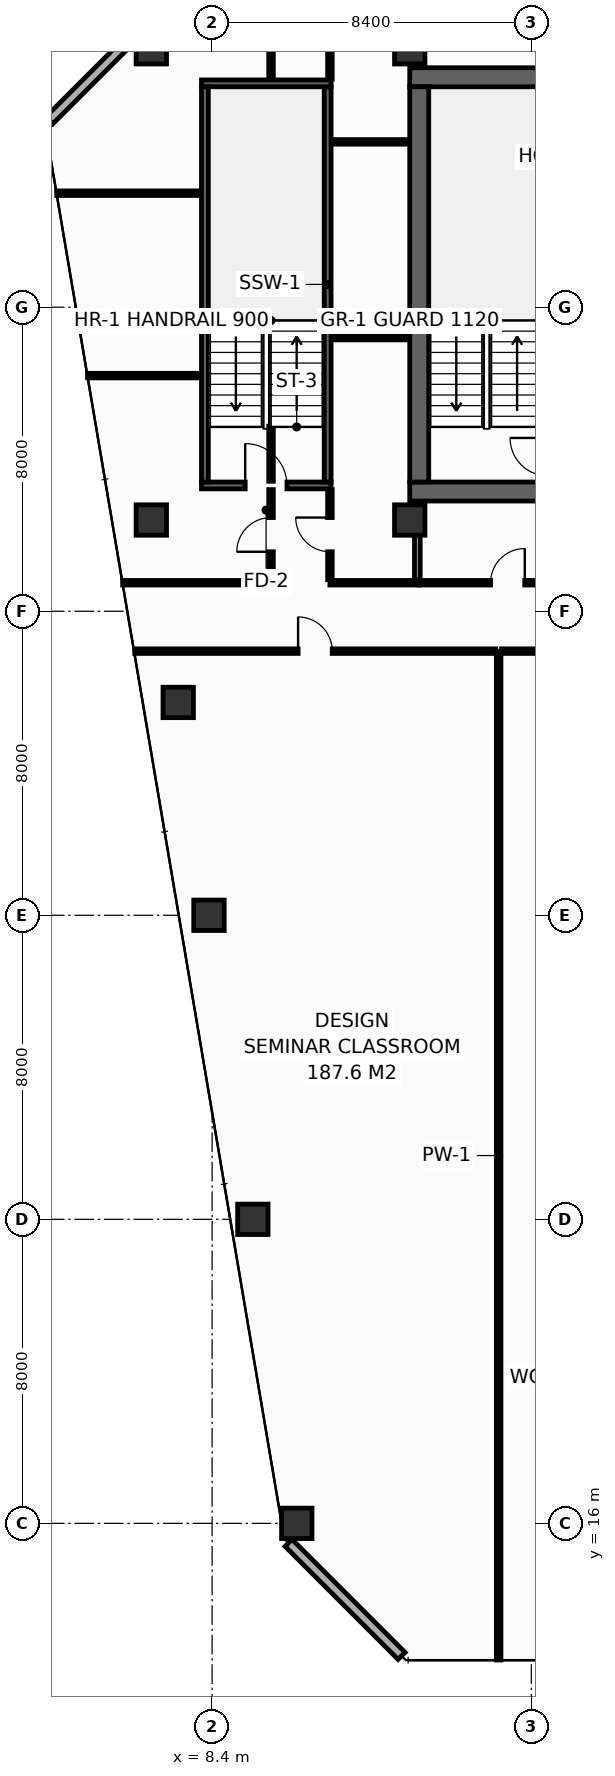
"""IFC4 building model, lengths in metres.
Left out: names, types, materials, properties, quantities, classifications, styles, units other than length and angle.
Written with IfcOpenShell. Run it as: python <this file> out.ifc"""

import sys

from ifc_helpers import new_model, si_unit, direction, frame, frame_2d, origin, origin_2d, place, context, subcontext, project, spatial, rectangle, hollow_rectangle, extrude, element, fill, save


model = new_model("IFC4")
c1 = context("Model", 3, precision=1e-05, world=origin(), true_north=direction((0.0, 1.0)))
c2 = subcontext(c1, "Body", "Model", "MODEL_VIEW")
j1 = project(units=[si_unit("LENGTHUNIT", "METRE"), si_unit("PLANEANGLEUNIT", "RADIAN")], contexts=[c1])
p1 = place(None, origin())
s1 = spatial("IfcSite", under=j1, at=p1, CompositionType="ELEMENT")
p2 = place(p1, origin())
s2 = spatial("IfcBuilding", under=s1, at=p2, CompositionType="ELEMENT")
p3 = place(p2, frame((0.0, 0.0, 220.8)))
s3 = spatial("IfcBuildingStorey", under=s2, at=p3, CompositionType="ELEMENT", Elevation=220.8)
p4 = place(p3, frame((13.6, 43.15, 0.0), z_axis=(0.0, 0.0, 1.0), x_axis=(1.0, 0.0, 0.0)))
e1 = element("IfcWall", 1, at=p4, inside=s3, PredefinedType="SHEAR", context=c2, shape_type="SweptSolid", body=[
    extrude(rectangle(XDim=32.7, YDim=0.5, at=frame_2d((16.35, 0.0))), origin(), (0.0, 0.0, 1.0), 3.35),
])
p5 = place(p4, frame((5.4, 0.0, 0.0)))
e2 = element("IfcOpeningElement", 2, at=p5, cuts=e1, PredefinedType="OPENING", context=c2, shape_type="SweptSolid", body=[
    extrude(rectangle(XDim=1.1, YDim=2.15, at=frame_2d((0.55, 1.075))), frame((0.0, 0.26, 0.0), z_axis=(0.0, -1.0, 0.0), x_axis=(1.0, 0.0, 0.0)), (0.0, 0.0, 1.0), 0.52),
])
p6 = place(p4, frame((25.6, 0.0, 0.0)))
e3 = element("IfcOpeningElement", 3, at=p6, cuts=e1, PredefinedType="OPENING", context=c2, shape_type="SweptSolid", body=[
    extrude(rectangle(XDim=1.1, YDim=2.15, at=frame_2d((0.55, 1.075))), frame((0.0, 0.26, 0.0), z_axis=(0.0, -1.0, 0.0), x_axis=(1.0, 0.0, 0.0)), (0.0, 0.0, 1.0), 0.52),
])
p7 = place(p3, frame((13.6, 54.05, 0.0), z_axis=(0.0, 0.0, 1.0), x_axis=(1.0, 0.0, 0.0)))
e4 = element("IfcWall", 4, at=p7, inside=s3, PredefinedType="SHEAR", context=c2, shape_type="SweptSolid", body=[
    extrude(rectangle(XDim=32.7, YDim=0.5, at=frame_2d((16.35, 0.0))), origin(), (0.0, 0.0, 1.0), 3.35),
])
p8 = place(p3, frame((13.85, 43.4, 0.0), z_axis=(0.0, 0.0, 1.0), x_axis=(0.0, 1.0, 0.0)))
e5 = element("IfcWall", 5, at=p8, inside=s3, PredefinedType="SHEAR", context=c2, shape_type="SweptSolid", body=[
    extrude(rectangle(XDim=10.4, YDim=0.5, at=frame_2d((5.2, 0.0))), origin(), (0.0, 0.0, 1.0), 3.35),
])
for number, where, z_axis, x_axis in (
    (6, (6.8, 54.8, 0.0), (0.0, 0.0, 1.0), (1.0, 0.0, 0.0)),
    (7, (13.6, 54.8, 0.0), (0.0, 0.0, 1.0), (1.0, 0.0, 0.0)),
    (8, (6.8, 42.4, 0.0), (0.0, 0.0, 1.0), (1.0, 0.0, 0.0)),
    (9, (13.6, 42.4, 0.0), (0.0, 0.0, 1.0), (1.0, 0.0, 0.0)),
    (10, (10.628, 16.0, 0.0), (0.0, 0.0, 1.0), (1.0, 0.0, 0.0)),
    (11, (9.472, 24.0, 0.0), (0.0, 0.0, 1.0), (1.0, 0.0, 0.0)),
    (12, (8.317, 32.0, 0.0), (0.0, 0.0, 1.0), (1.0, 0.0, 0.0)),
    (13, (7.508, 37.6, 0.0), (0.0, 0.0, 1.0), (1.0, 0.0, 0.0)),
):
    element("IfcColumn", number, at=place(p3, frame(where, z_axis=z_axis, x_axis=x_axis)), inside=s3, PredefinedType="COLUMN", context=c2, shape_type="SweptSolid", body=[
        extrude(hollow_rectangle(XDim=0.8, YDim=0.8, WallThickness=0.036, at=origin_2d()), origin(), (0.0, 0.0, 1.0), 3.8),
    ])
p9 = place(p3, frame((8.12, 43.31, 0.0), z_axis=(0.0, 0.0, 1.0), x_axis=(1.0, 0.0, 0.0)))
e14 = element("IfcWall", 14, at=p9, inside=s3, PredefinedType="SHEAR", context=c2, shape_type="SweptSolid", body=[
    extrude(rectangle(XDim=3.41, YDim=0.18, at=frame_2d((1.705, 0.0))), origin(), (0.0, 0.0, 1.0), 3.35),
])
p10 = place(p9, frame((1.15, 0.0, 0.0)))
e15 = element("IfcOpeningElement", 15, at=p10, cuts=e14, PredefinedType="OPENING", context=c2, shape_type="SweptSolid", body=[
    extrude(rectangle(XDim=1.1, YDim=2.15, at=frame_2d((0.55, 1.075))), frame((0.0, 0.1, 0.0), z_axis=(0.0, -1.0, 0.0), x_axis=(1.0, 0.0, 0.0)), (0.0, 0.0, 1.0), 0.2),
])
p11 = place(p3, frame((11.44, 43.4, 0.0), z_axis=(0.0, 0.0, 1.0), x_axis=(0.0, 1.0, 0.0)))
e16 = element("IfcWall", 16, at=p11, inside=s3, PredefinedType="SHEAR", context=c2, shape_type="SweptSolid", body=[
    extrude(rectangle(XDim=10.4, YDim=0.18, at=frame_2d((5.2, 0.0))), origin(), (0.0, 0.0, 1.0), 3.35),
])
p12 = place(p3, frame((11.53, 53.89, 0.0), z_axis=(0.0, 0.0, 1.0), x_axis=(-1.0, 0.0, 0.0)))
e17 = element("IfcWall", 17, at=p12, inside=s3, PredefinedType="SHEAR", context=c2, shape_type="SweptSolid", body=[
    extrude(rectangle(XDim=3.41, YDim=0.18, at=frame_2d((1.705, 0.0))), origin(), (0.0, 0.0, 1.0), 3.35),
])
p13 = place(p3, frame((8.21, 53.8, 0.0), z_axis=(0.0, 0.0, 1.0), x_axis=(0.0, -1.0, 0.0)))
e18 = element("IfcWall", 18, at=p13, inside=s3, PredefinedType="SHEAR", context=c2, shape_type="SweptSolid", body=[
    extrude(rectangle(XDim=10.4, YDim=0.18, at=frame_2d((5.2, 0.0))), origin(), (0.0, 0.0, 1.0), 3.35),
])
p14 = place(p3, frame((10.411, 15.487, 0.0), z_axis=(0.0, 0.0, 1.0), x_axis=(0.707135806771, -0.70707775441, 0.0)))
e19 = element("IfcWall", 19, at=p14, inside=s3, PredefinedType="STANDARD", context=c2, shape_type="SweptSolid", body=[
    extrude(rectangle(XDim=4.206, YDim=0.26, at=frame_2d((2.103, 0.0))), origin(), (0.0, 0.0, 1.0), 3.35),
])
p15 = place(p3, frame((7.087, 55.887, 0.0), z_axis=(0.0, 0.0, 1.0), x_axis=(-0.707106781187, -0.707106781187, 0.0)))
e20 = element("IfcWall", 20, at=p15, inside=s3, PredefinedType="STANDARD", context=c2, shape_type="SweptSolid", body=[
    extrude(rectangle(XDim=4.206, YDim=0.26, at=frame_2d((2.103, 0.0))), origin(), (0.0, 0.0, 1.0), 3.35),
])
p16 = place(p3, frame((6.045, 40.75, 0.0), z_axis=(0.0, 0.0, 1.0), x_axis=(1.0, 0.0, 0.0)))
e21 = element("IfcWall", 21, at=p16, inside=s3, PredefinedType="PARTITIONING", context=c2, shape_type="SweptSolid", body=[
    extrude(rectangle(XDim=3.905, YDim=0.12, at=frame_2d((1.952, 0.0))), origin(), (0.0, 0.0, 1.0), 2.835),
])
p17 = place(p3, frame((11.5, 40.75, 0.0), z_axis=(0.0, 0.0, 1.0), x_axis=(1.0, 0.0, 0.0)))
e22 = element("IfcWall", 22, at=p17, inside=s3, PredefinedType="PARTITIONING", context=c2, shape_type="SweptSolid", body=[
    extrude(rectangle(XDim=2.35, YDim=0.12, at=frame_2d((1.175, 0.0))), origin(), (0.0, 0.0, 1.0), 3.35),
])
p18 = place(p3, frame((11.55, 52.35, 0.0), z_axis=(0.0, 0.0, 1.0), x_axis=(1.0, 0.0, 0.0)))
e23 = element("IfcWall", 23, at=p18, inside=s3, PredefinedType="PARTITIONING", context=c2, shape_type="SweptSolid", body=[
    extrude(rectangle(XDim=2.03, YDim=0.12, at=frame_2d((1.015, 0.0))), origin(), (0.0, 0.0, 1.0), 3.35),
])
p19 = place(p3, frame((11.5, 54.0, 0.0), z_axis=(0.0, 0.0, 1.0), x_axis=(0.0, 1.0, 0.0)))
e24 = element("IfcWall", 24, at=p19, inside=s3, PredefinedType="PARTITIONING", context=c2, shape_type="SweptSolid", body=[
    extrude(rectangle(XDim=1.995, YDim=0.12, at=frame_2d((0.998, 0.0))), origin(), (0.0, 0.0, 1.0), 2.735),
])
p20 = place(p3, frame((5.122, 46.2, 0.0), z_axis=(0.0, 0.0, 1.0), x_axis=(1.0, 0.0, 0.0)))
e25 = element("IfcWall", 25, at=p20, inside=s3, PredefinedType="PARTITIONING", context=c2, shape_type="SweptSolid", body=[
    extrude(rectangle(XDim=2.978, YDim=0.12, at=frame_2d((1.489, 0.0))), origin(), (0.0, 0.0, 1.0), 2.635),
])
p21 = place(p3, frame((4.31, 51.0, 0.0), z_axis=(0.0, 0.0, 1.0), x_axis=(1.0, 0.0, 0.0)))
e26 = element("IfcWall", 26, at=p21, inside=s3, PredefinedType="PARTITIONING", context=c2, shape_type="SweptSolid", body=[
    extrude(rectangle(XDim=3.79, YDim=0.12, at=frame_2d((1.895, 0.0))), origin(), (0.0, 0.0, 1.0), 2.635),
])
p22 = place(p3, frame((9.95, 40.83, 0.0), z_axis=(0.0, 0.0, 1.0), x_axis=(0.0, 1.0, 0.0)))
e27 = element("IfcWall", 27, at=p22, inside=s3, PredefinedType="PARTITIONING", context=c2, shape_type="SweptSolid", body=[
    extrude(rectangle(XDim=2.37, YDim=0.12, at=frame_2d((1.185, 0.0))), origin(), (0.0, 0.0, 1.0), 2.635),
])
p23 = place(p22, frame((0.735, 0.0, 0.0)))
e28 = element("IfcOpeningElement", 28, at=p23, cuts=e27, PredefinedType="OPENING", context=c2, shape_type="SweptSolid", body=[
    extrude(rectangle(XDim=0.9, YDim=2.1, at=frame_2d((0.45, 1.05))), frame((0.0, 0.07, 0.0), z_axis=(0.0, -1.0, 0.0), x_axis=(1.0, 0.0, 0.0)), (0.0, 0.0, 1.0), 0.14),
])
p24 = place(p3, frame((9.95, 43.42, 0.0), z_axis=(0.0, 0.0, 1.0), x_axis=(0.0, 1.0, 0.0)))
e29 = element("IfcWall", 29, at=p24, inside=s3, PredefinedType="PARTITIONING", context=c2, shape_type="SweptSolid", body=[
    extrude(rectangle(XDim=1.45, YDim=0.12, at=frame_2d((0.725, 0.0))), origin(), (0.0, 0.0, 1.0), 3.35),
])
p25 = place(p3, frame((9.95, 54.0, 0.0), z_axis=(0.0, 0.0, 1.0), x_axis=(0.0, 1.0, 0.0)))
e30 = element("IfcWall", 30, at=p25, inside=s3, PredefinedType="PARTITIONING", context=c2, shape_type="SweptSolid", body=[
    extrude(rectangle(XDim=1.995, YDim=0.12, at=frame_2d((0.998, 0.0))), origin(), (0.0, 0.0, 1.0), 2.735),
])
p26 = place(p3, frame((11.55, 47.2, 0.0), z_axis=(0.0, 0.0, 1.0), x_axis=(1.0, 0.0, 0.0)))
e31 = element("IfcWall", 31, at=p26, inside=s3, PredefinedType="PARTITIONING", context=c2, shape_type="SweptSolid", body=[
    extrude(rectangle(XDim=2.03, YDim=0.12, at=frame_2d((1.015, 0.0))), origin(), (0.0, 0.0, 1.0), 3.35),
])
p27 = place(p3, frame((11.5, 40.83, 0.0), z_axis=(0.0, 0.0, 1.0), x_axis=(0.0, 1.0, 0.0)))
e32 = element("IfcWall", 32, at=p27, inside=s3, PredefinedType="PARTITIONING", context=c2, shape_type="SweptSolid", body=[
    extrude(rectangle(XDim=2.37, YDim=0.12, at=frame_2d((1.185, 0.0))), origin(), (0.0, 0.0, 1.0), 2.635),
])
p28 = place(p27, frame((0.735, 0.0, 0.0)))
e33 = element("IfcOpeningElement", 33, at=p28, cuts=e32, PredefinedType="OPENING", context=c2, shape_type="SweptSolid", body=[
    extrude(rectangle(XDim=0.9, YDim=2.1, at=frame_2d((0.45, 1.05))), frame((0.0, 0.07, 0.0), z_axis=(0.0, -1.0, 0.0), x_axis=(1.0, 0.0, 0.0)), (0.0, 0.0, 1.0), 0.14),
])
p29 = place(p3, frame((13.8, 40.83, 0.0), z_axis=(0.0, 0.0, 1.0), x_axis=(0.0, 1.0, 0.0)))
e34 = element("IfcWall", 34, at=p29, inside=s3, PredefinedType="PARTITIONING", context=c2, shape_type="SweptSolid", body=[
    extrude(rectangle(XDim=2.05, YDim=0.15, at=frame_2d((1.025, 0.0))), origin(), (0.0, 0.0, 1.0), 3.35),
])
p30 = place(p3, frame((13.85, 40.75, 0.0), z_axis=(0.0, 0.0, 1.0), x_axis=(1.0, 0.0, 0.0)))
e35 = element("IfcWall", 35, at=p30, inside=s3, PredefinedType="PARTITIONING", context=c2, shape_type="SweptSolid", body=[
    extrude(rectangle(XDim=4.655, YDim=0.12, at=frame_2d((2.327, 0.0))), origin(), (0.0, 0.0, 1.0), 3.35),
])
p31 = place(p30, frame((1.877, 0.0, 0.0)))
e36 = element("IfcOpeningElement", 36, at=p31, cuts=e35, PredefinedType="OPENING", context=c2, shape_type="SweptSolid", body=[
    extrude(rectangle(XDim=0.9, YDim=2.1, at=frame_2d((0.45, 1.05))), frame((0.0, 0.07, 0.0), z_axis=(0.0, -1.0, 0.0), x_axis=(1.0, 0.0, 0.0)), (0.0, 0.0, 1.0), 0.14),
])
p32 = place(p3, frame((15.94, 12.405, 0.0), z_axis=(0.0, 0.0, 1.0), x_axis=(0.0, 1.0, 0.0)))
e37 = element("IfcWall", 37, at=p32, inside=s3, PredefinedType="PARTITIONING", context=c2, shape_type="SweptSolid", body=[
    extrude(rectangle(XDim=26.545, YDim=0.12, at=frame_2d((13.272, 0.0))), origin(), (0.0, 0.0, 1.0), 2.635),
])
p33 = place(p3, frame((6.363, 38.95, 0.0), z_axis=(0.0, 0.0, 1.0), x_axis=(1.0, 0.0, 0.0)))
e38 = element("IfcWall", 38, at=p33, inside=s3, PredefinedType="PARTITIONING", context=c2, shape_type="SweptSolid", body=[
    extrude(rectangle(XDim=9.497, YDim=0.12, at=frame_2d((4.749, 0.0))), origin(), (0.0, 0.0, 1.0), 2.835),
])
p34 = place(p33, frame((4.299, 0.0, 0.0)))
e39 = element("IfcOpeningElement", 39, at=p34, cuts=e38, PredefinedType="OPENING", context=c2, shape_type="SweptSolid", body=[
    extrude(rectangle(XDim=0.9, YDim=2.1, at=frame_2d((0.45, 1.05))), frame((0.0, 0.07, 0.0), z_axis=(0.0, -1.0, 0.0), x_axis=(1.0, 0.0, 0.0)), (0.0, 0.0, 1.0), 0.14),
])
p35 = place(p3, frame((16.02, 38.95, 0.0), z_axis=(0.0, 0.0, 1.0), x_axis=(1.0, 0.0, 0.0)))
e40 = element("IfcWall", 40, at=p35, inside=s3, PredefinedType="PARTITIONING", context=c2, shape_type="SweptSolid", body=[
    extrude(rectangle(XDim=7.83, YDim=0.12, at=frame_2d((3.915, 0.0))), origin(), (0.0, 0.0, 1.0), 2.635),
])
p36 = place(p35, frame((3.465, 0.0, 0.0)))
e41 = element("IfcOpeningElement", 41, at=p36, cuts=e40, PredefinedType="OPENING", context=c2, shape_type="SweptSolid", body=[
    extrude(rectangle(XDim=0.9, YDim=2.1, at=frame_2d((0.45, 1.05))), frame((0.0, 0.07, 0.0), z_axis=(0.0, -1.0, 0.0), x_axis=(1.0, 0.0, 0.0)), (0.0, 0.0, 1.0), 0.14),
])
p37 = place(p10, origin())
e42 = element("IfcDoor", 42, at=p37, inside=s3, OperationType="SINGLE_SWING_LEFT", PredefinedType="DOOR", context=c2, shape_type="SweptSolid", body=[
    extrude(rectangle(XDim=1.1, YDim=2.15, at=frame_2d((0.55, 1.075))), frame((0.0, 0.025, 0.0), z_axis=(0.0, -1.0, 0.0), x_axis=(1.0, 0.0, 0.0)), (0.0, 0.0, 1.0), 0.05),
])
fill(e15, e42)
p38 = place(p23, origin())
e43 = element("IfcDoor", 43, at=p38, inside=s3, OperationType="SINGLE_SWING_LEFT", PredefinedType="DOOR", context=c2, shape_type="SweptSolid", body=[
    extrude(rectangle(XDim=0.9, YDim=2.1, at=frame_2d((0.45, 1.05))), frame((0.0, 0.025, 0.0), z_axis=(0.0, -1.0, 0.0), x_axis=(1.0, 0.0, 0.0)), (0.0, 0.0, 1.0), 0.05),
])
fill(e28, e43)
p39 = place(p28, origin())
e44 = element("IfcDoor", 44, at=p39, inside=s3, OperationType="SINGLE_SWING_RIGHT", PredefinedType="DOOR", context=c2, shape_type="SweptSolid", body=[
    extrude(rectangle(XDim=0.9, YDim=2.1, at=frame_2d((0.45, 1.05))), frame((0.0, 0.025, 0.0), z_axis=(0.0, -1.0, 0.0), x_axis=(1.0, 0.0, 0.0)), (0.0, 0.0, 1.0), 0.05),
])
fill(e33, e44)
p40 = place(p31, origin())
e45 = element("IfcDoor", 45, at=p40, inside=s3, OperationType="SINGLE_SWING_RIGHT", PredefinedType="DOOR", context=c2, shape_type="SweptSolid", body=[
    extrude(rectangle(XDim=0.9, YDim=2.1, at=frame_2d((0.45, 1.05))), frame((0.0, 0.025, 0.0), z_axis=(0.0, -1.0, 0.0), x_axis=(1.0, 0.0, 0.0)), (0.0, 0.0, 1.0), 0.05),
])
fill(e36, e45)
p41 = place(p34, origin())
e46 = element("IfcDoor", 46, at=p41, inside=s3, OperationType="SINGLE_SWING_LEFT", PredefinedType="DOOR", context=c2, shape_type="SweptSolid", body=[
    extrude(rectangle(XDim=0.9, YDim=2.1, at=frame_2d((0.45, 1.05))), frame((0.0, 0.025, 0.0), z_axis=(0.0, -1.0, 0.0), x_axis=(1.0, 0.0, 0.0)), (0.0, 0.0, 1.0), 0.05),
])
fill(e39, e46)
save(model, sys.argv[1])
